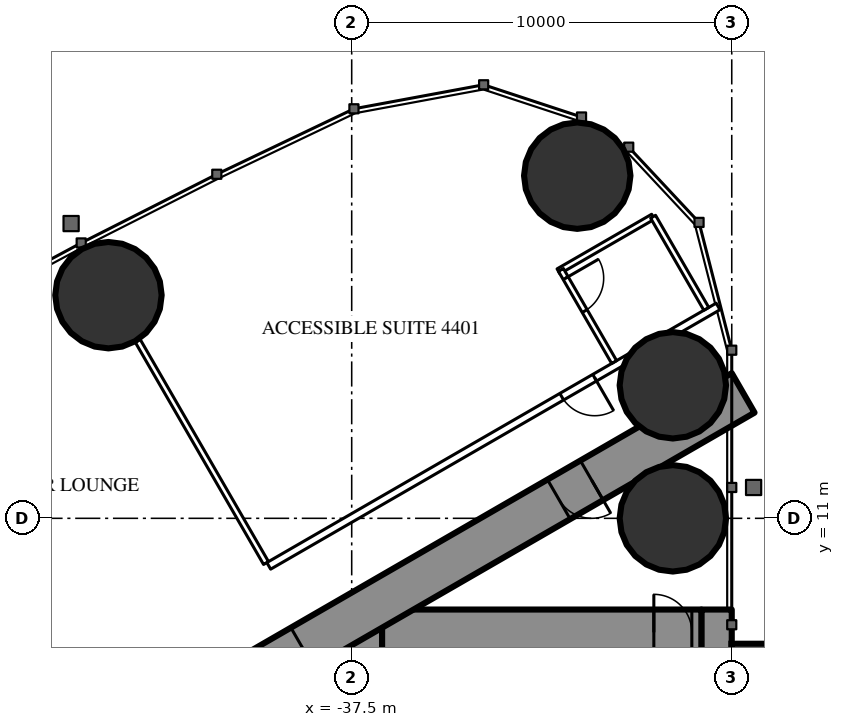
"""IFC4 building model, lengths in metres.
Left out: names, types, materials, properties, quantities, classifications, styles, units other than length and angle.
Written with IfcOpenShell. Run it as: python <this file> out.ifc"""

import sys

from ifc_helpers import new_model, si_unit, direction, frame, frame_2d, origin, origin_2d, place, context, subcontext, project, spatial, rectangle, circle, extrude, element, fill, save


model = new_model("IFC4")
c1 = context("Model", 3, precision=1e-05, world=origin(), true_north=direction((0.0, 1.0)))
c2 = subcontext(c1, "Body", "Model", "MODEL_VIEW")
j1 = project(units=[si_unit("LENGTHUNIT", "METRE"), si_unit("PLANEANGLEUNIT", "RADIAN")], contexts=[c1])
p1 = place(None, origin())
s1 = spatial("IfcSite", under=j1, at=p1, CompositionType="ELEMENT")
p2 = place(p1, origin())
s2 = spatial("IfcBuilding", under=s1, at=p2, CompositionType="ELEMENT")
p3 = place(p2, frame((0.0, 0.0, 166.8)))
s3 = spatial("IfcBuildingStorey", under=s2, at=p3, CompositionType="ELEMENT", Elevation=166.8)
for number, where, z_axis, x_axis in (
    (1, (-31.565, 20.016, 0.0), (0.0, 0.0, 1.0), (1.0, 0.0, 0.0)),
    (2, (-29.05, 11.0, 0.0), (0.0, 0.0, 1.0), (1.0, 0.0, 0.0)),
    (3, (-29.05, 14.5, 0.0), (0.0, 0.0, 1.0), (1.0, 0.0, 0.0)),
    (4, (-43.9, 16.871, 0.0), (0.0, 0.0, 1.0), (1.0, 0.0, 0.0)),
):
    element("IfcColumn", number, at=place(p3, frame(where, z_axis=z_axis, x_axis=x_axis)), inside=s3, PredefinedType="COLUMN", context=c2, shape_type="SweptSolid", body=[
        extrude(circle(Radius=1.4, at=origin_2d()), origin(), (0.0, 0.0, 1.0), 3.5),
    ])
p4 = place(p3, frame((-27.9, 8.6, 0.0), z_axis=(0.0, 0.0, 1.0), x_axis=(0.0, -1.0, 0.0)))
e5 = element("IfcWall", 5, at=p4, inside=s3, PredefinedType="SHEAR", context=c2, shape_type="SweptSolid", body=[
    extrude(rectangle(XDim=17.2, YDim=0.8, at=frame_2d((8.6, 0.0))), origin(), (0.0, 0.0, 1.0), 3.5),
])
p5 = place(p4, frame((2.45, 0.0, 0.6)))
e6 = element("IfcOpeningElement", 6, at=p5, cuts=e5, PredefinedType="OPENING", context=c2, shape_type="SweptSolid", body=[
    extrude(rectangle(XDim=0.6, YDim=2.1, at=frame_2d((0.3, 1.05))), frame((0.0, 0.41, 0.0), z_axis=(0.0, -1.0, 0.0), x_axis=(1.0, 0.0, 0.0)), (0.0, 0.0, 1.0), 0.82),
])
p6 = place(p4, frame((14.15, 0.0, 0.6)))
e7 = element("IfcOpeningElement", 7, at=p6, cuts=e5, PredefinedType="OPENING", context=c2, shape_type="SweptSolid", body=[
    extrude(rectangle(XDim=0.6, YDim=2.1, at=frame_2d((0.3, 1.05))), frame((0.0, 0.41, 0.0), z_axis=(0.0, -1.0, 0.0), x_axis=(1.0, 0.0, 0.0)), (0.0, 0.0, 1.0), 0.82),
])
p7 = place(p3, frame((-37.3, 8.6, 0.0), z_axis=(0.0, 0.0, 1.0), x_axis=(0.0, -1.0, 0.0)))
e8 = element("IfcWall", 8, at=p7, inside=s3, PredefinedType="SHEAR", context=c2, shape_type="SweptSolid", body=[
    extrude(rectangle(XDim=17.2, YDim=1.2, at=frame_2d((8.6, 0.0))), origin(), (0.0, 0.0, 1.0), 3.5),
])
p8 = place(p7, frame((7.7, 0.0, 0.0)))
e9 = element("IfcOpeningElement", 9, at=p8, cuts=e8, PredefinedType="OPENING", context=c2, shape_type="SweptSolid", body=[
    extrude(rectangle(XDim=1.8, YDim=2.2, at=frame_2d((0.9, 1.1))), frame((0.0, 0.61, 0.0), z_axis=(0.0, -1.0, 0.0), x_axis=(1.0, 0.0, 0.0)), (0.0, 0.0, 1.0), 1.22),
])
p9 = place(p3, frame((-28.3, 8.0, 0.0), z_axis=(0.0, 0.0, 1.0), x_axis=(-1.0, 0.0, 0.0)))
e10 = element("IfcWall", 10, at=p9, inside=s3, PredefinedType="SHEAR", context=c2, shape_type="SweptSolid", body=[
    extrude(rectangle(XDim=8.4, YDim=1.2, at=frame_2d((4.2, 0.0))), origin(), (0.0, 0.0, 1.0), 3.5),
])
p10 = place(p9, frame((0.25, 0.0, 0.0)))
e11 = element("IfcOpeningElement", 11, at=p10, cuts=e10, PredefinedType="OPENING", context=c2, shape_type="SweptSolid", body=[
    extrude(rectangle(XDim=1.0, YDim=2.2, at=frame_2d((0.5, 1.1))), frame((0.0, 0.61, 0.0), z_axis=(0.0, -1.0, 0.0), x_axis=(1.0, 0.0, 0.0)), (0.0, 0.0, 1.0), 1.22),
])
p11 = place(p3, frame((-27.2, 14.3, 0.0), z_axis=(0.0, 0.0, 1.0), x_axis=(-0.866026593062, -0.499997940104, 0.0)))
e12 = element("IfcWall", 12, at=p11, inside=s3, PredefinedType="SHEAR", context=c2, shape_type="SweptSolid", body=[
    extrude(rectangle(XDim=28.946, YDim=1.2, at=frame_2d((14.473, 0.0))), origin(), (0.0, 0.0, 1.0), 3.5),
])
p12 = place(p11, frame((4.6, 0.0, 0.0)))
e13 = element("IfcOpeningElement", 13, at=p12, cuts=e12, PredefinedType="OPENING", context=c2, shape_type="SweptSolid", body=[
    extrude(rectangle(XDim=1.0, YDim=2.2, at=frame_2d((0.5, 1.1))), frame((0.0, 0.61, 0.0), z_axis=(0.0, -1.0, 0.0), x_axis=(1.0, 0.0, 0.0)), (0.0, 0.0, 1.0), 1.22),
])
p13 = place(p11, frame((13.395, 0.0, 0.0)))
e14 = element("IfcOpeningElement", 14, at=p13, cuts=e12, PredefinedType="OPENING", context=c2, shape_type="SweptSolid", body=[
    extrude(rectangle(XDim=1.8, YDim=2.2, at=frame_2d((0.9, 1.1))), frame((0.0, 0.61, 0.0), z_axis=(0.0, -1.0, 0.0), x_axis=(1.0, 0.0, 0.0)), (0.0, 0.0, 1.0), 1.22),
])
p14 = place(p3, frame((-39.754, 9.823, 0.0), z_axis=(0.0, 0.0, 1.0), x_axis=(-0.499997670926, 0.866026748472, 0.0)))
e15 = element("IfcWall", 15, at=p14, inside=s3, PredefinedType="PARTITIONING", context=c2, shape_type="SweptSolid", body=[
    extrude(rectangle(XDim=6.757, YDim=0.15, at=frame_2d((3.379, 0.0))), origin(), (0.0, 0.0, 1.0), 2.3),
])
p15 = place(p3, frame((-27.86, 16.575, 0.0), z_axis=(0.0, 0.0, 1.0), x_axis=(-0.866026850238, -0.499997494661, 0.0)))
e16 = element("IfcWall", 16, at=p15, inside=s3, PredefinedType="PARTITIONING", context=c2, shape_type="SweptSolid", body=[
    extrude(rectangle(XDim=13.651, YDim=0.2, at=frame_2d((6.826, 0.0))), origin(), (0.0, 0.0, 1.0), 3.25),
])
p16 = place(p15, frame((3.75, 0.0, 0.0)))
e17 = element("IfcOpeningElement", 17, at=p16, cuts=e16, PredefinedType="OPENING", context=c2, shape_type="SweptSolid", body=[
    extrude(rectangle(XDim=1.0, YDim=2.2, at=frame_2d((0.5, 1.1))), frame((0.0, 0.11, 0.0), z_axis=(0.0, -1.0, 0.0), x_axis=(1.0, 0.0, 0.0)), (0.0, 0.0, 1.0), 0.22),
])
p17 = place(p3, frame((-29.57, 18.936, 0.0), z_axis=(0.0, 0.0, 1.0), x_axis=(-0.866018712932, -0.500011588718, 0.0)))
e18 = element("IfcWall", 18, at=p17, inside=s3, PredefinedType="PARTITIONING", context=c2, shape_type="SweptSolid", body=[
    extrude(rectangle(XDim=2.875, YDim=0.15, at=frame_2d((1.438, 0.0))), origin(), (0.0, 0.0, 1.0), 3.25),
])
p18 = place(p3, frame((-30.595, 15.111, 0.0), z_axis=(0.0, 0.0, 1.0), x_axis=(-0.49998411664, 0.866034573852, 0.0)))
e19 = element("IfcWall", 19, at=p18, inside=s3, PredefinedType="PARTITIONING", context=c2, shape_type="SweptSolid", body=[
    extrude(rectangle(XDim=2.8, YDim=0.15, at=frame_2d((1.4, 0.0))), origin(), (0.0, 0.0, 1.0), 3.25),
])
p19 = place(p18, frame((1.55, 0.0, 0.0)))
e20 = element("IfcOpeningElement", 20, at=p19, cuts=e19, PredefinedType="OPENING", context=c2, shape_type="SweptSolid", body=[
    extrude(rectangle(XDim=1.0, YDim=2.2, at=frame_2d((0.5, 1.1))), frame((0.0, 0.085, 0.0), z_axis=(0.0, -1.0, 0.0), x_axis=(1.0, 0.0, 0.0)), (0.0, 0.0, 1.0), 0.17),
])
p20 = place(p3, frame((-28.17, 16.511, 0.0), z_axis=(0.0, 0.0, 1.0), x_axis=(-0.49994636267, 0.866056369097, 0.0)))
e21 = element("IfcWall", 21, at=p20, inside=s3, PredefinedType="PARTITIONING", context=c2, shape_type="SweptSolid", body=[
    extrude(rectangle(XDim=2.8, YDim=0.15, at=frame_2d((1.4, 0.0))), origin(), (0.0, 0.0, 1.0), 3.25),
])
p21 = place(p19, origin())
e22 = element("IfcDoor", 22, at=p21, inside=s3, OperationType="SINGLE_SWING_RIGHT", PredefinedType="DOOR", context=c2, shape_type="SweptSolid", body=[
    extrude(rectangle(XDim=1.0, YDim=2.2, at=frame_2d((0.5, 1.1))), frame((0.0, 0.025, 0.0), z_axis=(0.0, -1.0, 0.0), x_axis=(1.0, 0.0, 0.0)), (0.0, 0.0, 1.0), 0.05),
])
fill(e20, e22)
p22 = place(p16, origin())
e23 = element("IfcDoor", 23, at=p22, inside=s3, OperationType="SINGLE_SWING_LEFT", PredefinedType="DOOR", context=c2, shape_type="SweptSolid", body=[
    extrude(rectangle(XDim=1.0, YDim=2.2, at=frame_2d((0.5, 1.1))), frame((0.0, 0.025, 0.0), z_axis=(0.0, -1.0, 0.0), x_axis=(1.0, 0.0, 0.0)), (0.0, 0.0, 1.0), 0.05),
])
fill(e17, e23)
p23 = place(p12, origin())
e24 = element("IfcDoor", 24, at=p23, inside=s3, OperationType="SINGLE_SWING_LEFT", PredefinedType="DOOR", context=c2, shape_type="SweptSolid", body=[
    extrude(rectangle(XDim=1.0, YDim=2.2, at=frame_2d((0.5, 1.1))), frame((0.0, 0.025, 0.0), z_axis=(0.0, -1.0, 0.0), x_axis=(1.0, 0.0, 0.0)), (0.0, 0.0, 1.0), 0.05),
])
fill(e13, e24)
p24 = place(p13, origin())
e25 = element("IfcDoor", 25, at=p24, inside=s3, OperationType="DOUBLE_DOOR_SINGLE_SWING", PredefinedType="DOOR", context=c2, shape_type="SweptSolid", body=[
    extrude(rectangle(XDim=1.8, YDim=2.2, at=frame_2d((0.9, 1.1))), frame((0.0, 0.025, 0.0), z_axis=(0.0, -1.0, 0.0), x_axis=(1.0, 0.0, 0.0)), (0.0, 0.0, 1.0), 0.05),
])
fill(e14, e25)
p25 = place(p10, origin())
e26 = element("IfcDoor", 26, at=p25, inside=s3, OperationType="SINGLE_SWING_RIGHT", PredefinedType="DOOR", context=c2, shape_type="SweptSolid", body=[
    extrude(rectangle(XDim=1.0, YDim=2.2, at=frame_2d((0.5, 1.1))), frame((0.0, 0.025, 0.0), z_axis=(0.0, -1.0, 0.0), x_axis=(1.0, 0.0, 0.0)), (0.0, 0.0, 1.0), 0.05),
])
fill(e11, e26)
save(model, sys.argv[1])
